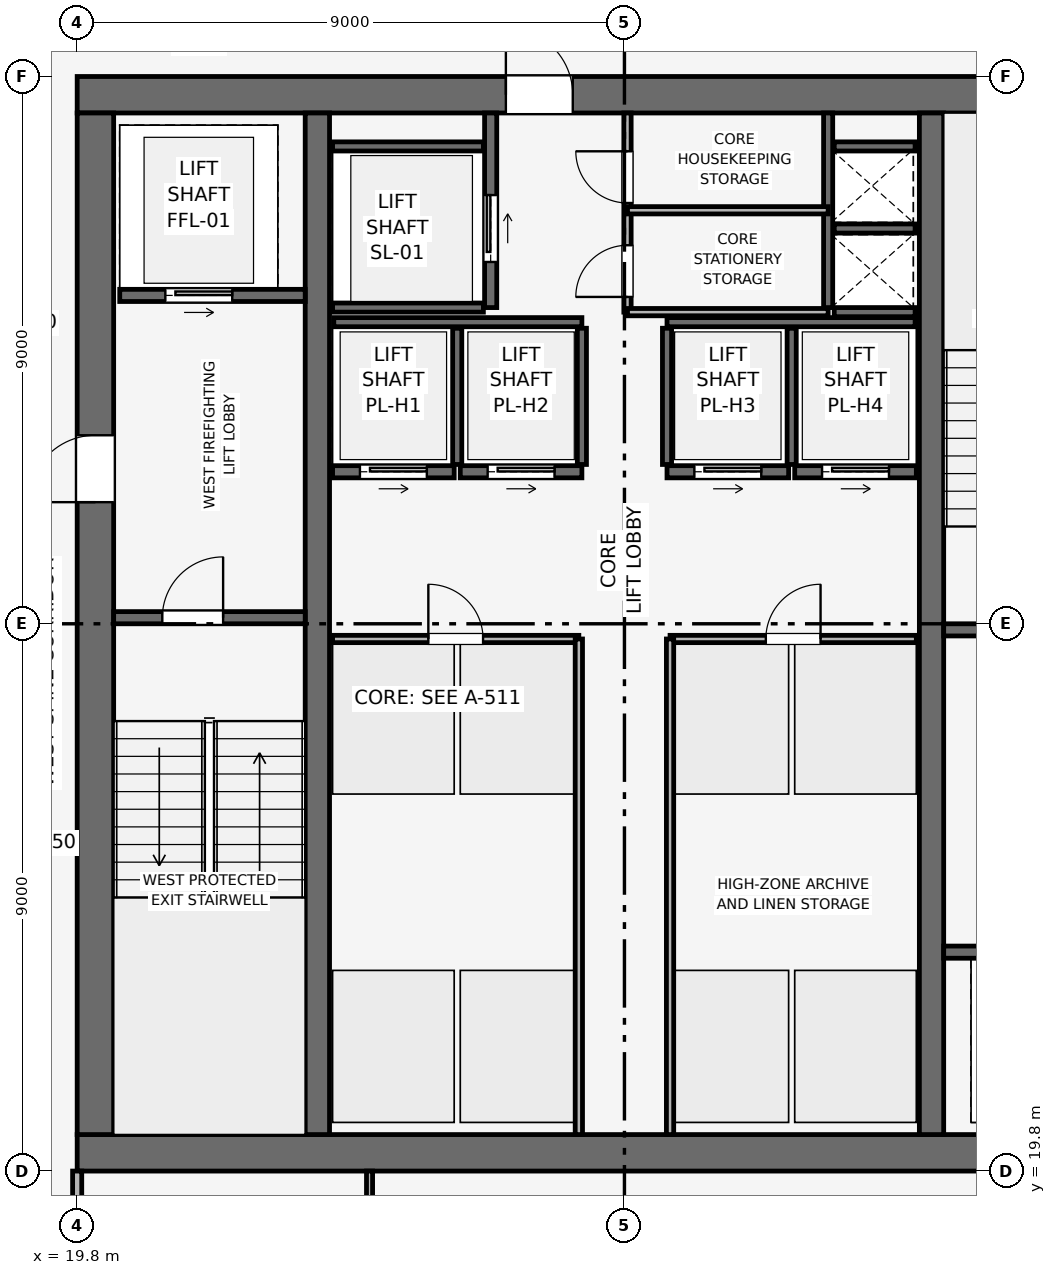
"""IFC4 building model, lengths in metres.
Left out: names, types, materials, properties, quantities, classifications, styles, units other than length and angle.
Written with IfcOpenShell. Run it as: python <this file> out.ifc"""

import sys

from ifc_helpers import new_model, si_unit, direction, frame, frame_2d, origin, place, context, subcontext, project, spatial, rectangle, extrude, element, fill, save


model = new_model("IFC4")
c1 = context("Model", 3, precision=1e-05, world=origin(), true_north=direction((0.0, 1.0)))
c2 = subcontext(c1, "Body", "Model", "MODEL_VIEW")
j1 = project(units=[si_unit("LENGTHUNIT", "METRE"), si_unit("PLANEANGLEUNIT", "RADIAN")], contexts=[c1])
p1 = place(None, origin())
s1 = spatial("IfcSite", under=j1, at=p1, CompositionType="ELEMENT")
p2 = place(p1, origin())
s2 = spatial("IfcBuilding", under=s1, at=p2, CompositionType="ELEMENT")
p3 = place(p2, frame((0.0, 0.0, 329.25)))
s3 = spatial("IfcBuildingStorey", under=s2, at=p3, CompositionType="ELEMENT", Elevation=329.25)
p4 = place(p3, frame((19.8, 20.1, 0.0), z_axis=(0.0, 0.0, 1.0), x_axis=(1.0, 0.0, 0.0)))
e1 = element("IfcWall", 1, at=p4, inside=s3, PredefinedType="SHEAR", context=c2, shape_type="SweptSolid", body=[
    extrude(rectangle(XDim=18.0, YDim=0.6, at=frame_2d((9.0, 0.0))), origin(), (0.0, 0.0, 1.0), 3.75),
])
p5 = place(p3, frame((19.8, 37.5, 0.0), z_axis=(0.0, 0.0, 1.0), x_axis=(1.0, 0.0, 0.0)))
e2 = element("IfcWall", 2, at=p5, inside=s3, PredefinedType="SHEAR", context=c2, shape_type="SweptSolid", body=[
    extrude(rectangle(XDim=18.0, YDim=0.6, at=frame_2d((9.0, 0.0))), origin(), (0.0, 0.0, 1.0), 3.75),
])
p6 = place(p5, frame((7.05, 0.0, 0.0)))
e3 = element("IfcOpeningElement", 3, at=p6, cuts=e2, PredefinedType="OPENING", context=c2, shape_type="SweptSolid", body=[
    extrude(rectangle(XDim=1.1, YDim=2.15, at=frame_2d((0.55, 1.075))), frame((0.0, 0.31, 0.0), z_axis=(0.0, -1.0, 0.0), x_axis=(1.0, 0.0, 0.0)), (0.0, 0.0, 1.0), 0.62),
])
p7 = place(p3, frame((20.1, 20.4, 0.0), z_axis=(0.0, 0.0, 1.0), x_axis=(0.0, 1.0, 0.0)))
e4 = element("IfcWall", 4, at=p7, inside=s3, PredefinedType="SHEAR", context=c2, shape_type="SweptSolid", body=[
    extrude(rectangle(XDim=16.8, YDim=0.6, at=frame_2d((8.4, 0.0))), origin(), (0.0, 0.0, 1.0), 3.75),
])
p8 = place(p7, frame((10.4, 0.0, 0.0)))
e5 = element("IfcOpeningElement", 5, at=p8, cuts=e4, PredefinedType="OPENING", context=c2, shape_type="SweptSolid", body=[
    extrude(rectangle(XDim=1.1, YDim=2.15, at=frame_2d((0.55, 1.075))), frame((0.0, 0.31, 0.0), z_axis=(0.0, -1.0, 0.0), x_axis=(1.0, 0.0, 0.0)), (0.0, 0.0, 1.0), 0.62),
])
for number, where, z_axis, x_axis in (
    (6, (23.75, 20.4, 0.0), (0.0, 0.0, 1.0), (0.0, 1.0, 0.0)),
    (7, (33.85, 20.4, 0.0), (0.0, 0.0, 1.0), (0.0, 1.0, 0.0)),
):
    element("IfcWall", number, at=place(p3, frame(where, z_axis=z_axis, x_axis=x_axis)), inside=s3, PredefinedType="SHEAR", context=c2, shape_type="SweptSolid", body=[
        extrude(rectangle(XDim=16.8, YDim=0.4, at=frame_2d((8.4, 0.0))), origin(), (0.0, 0.0, 1.0), 3.75),
    ])
p9 = place(p3, frame((20.4, 28.9, 0.0), z_axis=(0.0, 0.0, 1.0), x_axis=(1.0, 0.0, 0.0)))
e8 = element("IfcWall", 8, at=p9, inside=s3, PredefinedType="SHEAR", context=c2, shape_type="SweptSolid", body=[
    extrude(rectangle(XDim=3.15, YDim=0.2, at=frame_2d((1.575, 0.0))), origin(), (0.0, 0.0, 1.0), 3.51),
])
p10 = place(p9, frame((0.8, 0.0, 0.0)))
e9 = element("IfcOpeningElement", 9, at=p10, cuts=e8, PredefinedType="OPENING", context=c2, shape_type="SweptSolid", body=[
    extrude(rectangle(XDim=1.0, YDim=2.1, at=frame_2d((0.5, 1.05))), frame((0.0, 0.11, 0.0), z_axis=(0.0, -1.0, 0.0), x_axis=(1.0, 0.0, 0.0)), (0.0, 0.0, 1.0), 0.22),
])
p11 = place(p3, frame((34.05, 28.7, 0.0), z_axis=(0.0, 0.0, 1.0), x_axis=(1.0, 0.0, 0.0)))
e10 = element("IfcWall", 10, at=p11, inside=s3, PredefinedType="SHEAR", context=c2, shape_type="SweptSolid", body=[
    extrude(rectangle(XDim=3.15, YDim=0.2, at=frame_2d((1.575, 0.0))), origin(), (0.0, 0.0, 1.0), 3.51),
])
p12 = place(p11, frame((0.8, 0.0, 0.0)))
e11 = element("IfcOpeningElement", 11, at=p12, cuts=e10, PredefinedType="OPENING", context=c2, shape_type="SweptSolid", body=[
    extrude(rectangle(XDim=1.0, YDim=2.1, at=frame_2d((0.5, 1.05))), frame((0.0, 0.11, 0.0), z_axis=(0.0, -1.0, 0.0), x_axis=(1.0, 0.0, 0.0)), (0.0, 0.0, 1.0), 0.22),
])
p13 = place(p3, frame((32.15, 34.0, 0.0), z_axis=(0.0, 0.0, 1.0), x_axis=(0.0, 1.0, 0.0)))
e12 = element("IfcWall", 12, at=p13, inside=s3, PredefinedType="SHEAR", context=c2, shape_type="SweptSolid", body=[
    extrude(rectangle(XDim=3.2, YDim=0.15, at=frame_2d((1.6, 0.0))), origin(), (0.0, 0.0, 1.0), 3.51),
])
for number, where, z_axis, x_axis in (
    (13, (32.25, 33.925, 0.0), (0.0, 0.0, 1.0), (1.0, 0.0, 0.0)),
    (14, (32.25, 35.3, 0.0), (0.0, 0.0, 1.0), (1.0, 0.0, 0.0)),
):
    element("IfcWall", number, at=place(p3, frame(where, z_axis=z_axis, x_axis=x_axis)), inside=s3, PredefinedType="SHEAR", context=c2, shape_type="SweptSolid", body=[
        extrude(rectangle(XDim=1.33, YDim=0.15, at=frame_2d((0.665, 0.0))), origin(), (0.0, 0.0, 1.0), 3.51),
    ])
p14 = place(p3, frame((20.5, 34.2, 0.0), z_axis=(0.0, 0.0, 1.0), x_axis=(1.0, 0.0, 0.0)))
e15 = element("IfcWall", 15, at=p14, inside=s3, PredefinedType="SHEAR", context=c2, shape_type="SweptSolid", body=[
    extrude(rectangle(XDim=3.05, YDim=0.2, at=frame_2d((1.525, 0.0))), origin(), (0.0, 0.0, 1.0), 3.51),
])
p15 = place(p14, frame((0.75, 0.0, 0.0)))
e16 = element("IfcOpeningElement", 16, at=p15, cuts=e15, PredefinedType="OPENING", context=c2, shape_type="SweptSolid", body=[
    extrude(rectangle(XDim=1.1, YDim=2.15, at=frame_2d((0.55, 1.075))), frame((0.0, 0.11, 0.0), z_axis=(0.0, -1.0, 0.0), x_axis=(1.0, 0.0, 0.0)), (0.0, 0.0, 1.0), 0.22),
])
p16 = place(p3, frame((34.05, 23.4, 0.0), z_axis=(0.0, 0.0, 1.0), x_axis=(1.0, 0.0, 0.0)))
e17 = element("IfcWall", 17, at=p16, inside=s3, PredefinedType="SHEAR", context=c2, shape_type="SweptSolid", body=[
    extrude(rectangle(XDim=3.05, YDim=0.2, at=frame_2d((1.525, 0.0))), origin(), (0.0, 0.0, 1.0), 3.51),
])
p17 = place(p16, frame((1.2, 0.0, 0.0)))
e18 = element("IfcOpeningElement", 18, at=p17, cuts=e17, PredefinedType="OPENING", context=c2, shape_type="SweptSolid", body=[
    extrude(rectangle(XDim=1.1, YDim=2.15, at=frame_2d((0.55, 1.075))), frame((0.0, 0.11, 0.0), z_axis=(0.0, -1.0, 0.0), x_axis=(1.0, 0.0, 0.0)), (0.0, 0.0, 1.0), 0.22),
])
p18 = place(p3, frame((26.6, 34.0, 0.0), z_axis=(0.0, 0.0, 1.0), x_axis=(0.0, 1.0, 0.0)))
e19 = element("IfcWall", 19, at=p18, inside=s3, PredefinedType="SHEAR", context=c2, shape_type="SweptSolid", body=[
    extrude(rectangle(XDim=3.2, YDim=0.2, at=frame_2d((1.6, 0.0))), origin(), (0.0, 0.0, 1.0), 3.51),
])
p19 = place(p18, frame((0.75, 0.0, 0.0)))
e20 = element("IfcOpeningElement", 20, at=p19, cuts=e19, PredefinedType="OPENING", context=c2, shape_type="SweptSolid", body=[
    extrude(rectangle(XDim=1.1, YDim=2.15, at=frame_2d((0.55, 1.075))), frame((0.0, 0.11, 0.0), z_axis=(0.0, -1.0, 0.0), x_axis=(1.0, 0.0, 0.0)), (0.0, 0.0, 1.0), 0.22),
])
for number, where, z_axis, x_axis in (
    (21, (24.0, 34.0, 0.0), (0.0, 0.0, 1.0), (1.0, 0.0, 0.0)),
    (22, (24.0, 36.65, 0.0), (0.0, 0.0, 1.0), (1.0, 0.0, 0.0)),
):
    element("IfcWall", number, at=place(p3, frame(where, z_axis=z_axis, x_axis=x_axis)), inside=s3, PredefinedType="SHEAR", context=c2, shape_type="SweptSolid", body=[
        extrude(rectangle(XDim=2.48, YDim=0.15, at=frame_2d((1.24, 0.0))), origin(), (0.0, 0.0, 1.0), 3.51),
    ])
p20 = place(p3, frame((24.0, 31.3, 0.0), z_axis=(0.0, 0.0, 1.0), x_axis=(1.0, 0.0, 0.0)))
e23 = element("IfcWall", 23, at=p20, inside=s3, PredefinedType="SHEAR", context=c2, shape_type="SweptSolid", body=[
    extrude(rectangle(XDim=2.0, YDim=0.2, at=frame_2d((1.0, 0.0))), origin(), (0.0, 0.0, 1.0), 3.51),
])
p21 = place(p20, frame((0.45, 0.0, 0.0)))
e24 = element("IfcOpeningElement", 24, at=p21, cuts=e23, PredefinedType="OPENING", context=c2, shape_type="SweptSolid", body=[
    extrude(rectangle(XDim=1.1, YDim=2.15, at=frame_2d((0.55, 1.075))), frame((0.0, 0.11, 0.0), z_axis=(0.0, -1.0, 0.0), x_axis=(1.0, 0.0, 0.0)), (0.0, 0.0, 1.0), 0.22),
])
p22 = place(p3, frame((26.1, 31.3, 0.0), z_axis=(0.0, 0.0, 1.0), x_axis=(1.0, 0.0, 0.0)))
e25 = element("IfcWall", 25, at=p22, inside=s3, PredefinedType="SHEAR", context=c2, shape_type="SweptSolid", body=[
    extrude(rectangle(XDim=2.0, YDim=0.2, at=frame_2d((1.0, 0.0))), origin(), (0.0, 0.0, 1.0), 3.51),
])
p23 = place(p22, frame((0.45, 0.0, 0.0)))
e26 = element("IfcOpeningElement", 26, at=p23, cuts=e25, PredefinedType="OPENING", context=c2, shape_type="SweptSolid", body=[
    extrude(rectangle(XDim=1.1, YDim=2.15, at=frame_2d((0.55, 1.075))), frame((0.0, 0.11, 0.0), z_axis=(0.0, -1.0, 0.0), x_axis=(1.0, 0.0, 0.0)), (0.0, 0.0, 1.0), 0.22),
])
p24 = place(p3, frame((29.5, 31.3, 0.0), z_axis=(0.0, 0.0, 1.0), x_axis=(1.0, 0.0, 0.0)))
e27 = element("IfcWall", 27, at=p24, inside=s3, PredefinedType="SHEAR", context=c2, shape_type="SweptSolid", body=[
    extrude(rectangle(XDim=2.0, YDim=0.2, at=frame_2d((1.0, 0.0))), origin(), (0.0, 0.0, 1.0), 3.51),
])
p25 = place(p24, frame((0.45, 0.0, 0.0)))
e28 = element("IfcOpeningElement", 28, at=p25, cuts=e27, PredefinedType="OPENING", context=c2, shape_type="SweptSolid", body=[
    extrude(rectangle(XDim=1.1, YDim=2.15, at=frame_2d((0.55, 1.075))), frame((0.0, 0.11, 0.0), z_axis=(0.0, -1.0, 0.0), x_axis=(1.0, 0.0, 0.0)), (0.0, 0.0, 1.0), 0.22),
])
p26 = place(p3, frame((31.6, 31.3, 0.0), z_axis=(0.0, 0.0, 1.0), x_axis=(1.0, 0.0, 0.0)))
e29 = element("IfcWall", 29, at=p26, inside=s3, PredefinedType="SHEAR", context=c2, shape_type="SweptSolid", body=[
    extrude(rectangle(XDim=2.0, YDim=0.2, at=frame_2d((1.0, 0.0))), origin(), (0.0, 0.0, 1.0), 3.51),
])
p27 = place(p26, frame((0.45, 0.0, 0.0)))
e30 = element("IfcOpeningElement", 30, at=p27, cuts=e29, PredefinedType="OPENING", context=c2, shape_type="SweptSolid", body=[
    extrude(rectangle(XDim=1.1, YDim=2.15, at=frame_2d((0.55, 1.075))), frame((0.0, 0.11, 0.0), z_axis=(0.0, -1.0, 0.0), x_axis=(1.0, 0.0, 0.0)), (0.0, 0.0, 1.0), 0.22),
])
p28 = place(p3, frame((32.25, 36.65, 0.0), z_axis=(0.0, 0.0, 1.0), x_axis=(1.0, 0.0, 0.0)))
e31 = element("IfcWall", 31, at=p28, inside=s3, PredefinedType="SHEAR", context=c2, shape_type="SweptSolid", body=[
    extrude(rectangle(XDim=1.33, YDim=0.15, at=frame_2d((0.665, 0.0))), origin(), (0.0, 0.0, 1.0), 3.51),
])
for number, where, z_axis, x_axis in (
    (32, (24.02, 33.76, 0.0), (0.0, 0.0, 1.0), (1.0, 0.0, 0.0)),
    (33, (29.5, 33.76, 0.0), (0.0, 0.0, 1.0), (1.0, 0.0, 0.0)),
):
    element("IfcWall", number, at=place(p3, frame(where, z_axis=z_axis, x_axis=x_axis)), inside=s3, PredefinedType="SHEAR", context=c2, shape_type="SweptSolid", body=[
        extrude(rectangle(XDim=4.08, YDim=0.15, at=frame_2d((2.04, 0.0))), origin(), (0.0, 0.0, 1.0), 3.51),
    ])
for number, where, z_axis, x_axis in (
    (34, (26.05, 31.42, 0.0), (0.0, 0.0, 1.0), (0.0, 1.0, 0.0)),
    (35, (28.1, 31.42, 0.0), (0.0, 0.0, 1.0), (0.0, 1.0, 0.0)),
    (36, (29.5, 31.42, 0.0), (0.0, 0.0, 1.0), (0.0, 1.0, 0.0)),
    (37, (31.55, 31.42, 0.0), (0.0, 0.0, 1.0), (0.0, 1.0, 0.0)),
):
    element("IfcWall", number, at=place(p3, frame(where, z_axis=z_axis, x_axis=x_axis)), inside=s3, PredefinedType="SHEAR", context=c2, shape_type="SweptSolid", body=[
        extrude(rectangle(XDim=2.24, YDim=0.15, at=frame_2d((1.12, 0.0))), origin(), (0.0, 0.0, 1.0), 3.51),
    ])
p29 = place(p3, frame((28.85, 33.925, 0.0), z_axis=(0.0, 0.0, 1.0), x_axis=(0.0, 1.0, 0.0)))
e38 = element("IfcWall", 38, at=p29, inside=s3, PredefinedType="PARTITIONING", context=c2, shape_type="SweptSolid", body=[
    extrude(rectangle(XDim=3.275, YDim=0.12, at=frame_2d((1.637, 0.0))), origin(), (0.0, 0.0, 1.0), 3.51),
])
p30 = place(p29, frame((0.25, 0.0, 0.0)))
e39 = element("IfcOpeningElement", 39, at=p30, cuts=e38, PredefinedType="OPENING", context=c2, shape_type="SweptSolid", body=[
    extrude(rectangle(XDim=0.85, YDim=2.1, at=frame_2d((0.425, 1.05))), frame((0.0, 0.07, 0.0), z_axis=(0.0, -1.0, 0.0), x_axis=(1.0, 0.0, 0.0)), (0.0, 0.0, 1.0), 0.14),
])
p31 = place(p29, frame((1.795, 0.0, 0.0)))
e40 = element("IfcOpeningElement", 40, at=p31, cuts=e38, PredefinedType="OPENING", context=c2, shape_type="SweptSolid", body=[
    extrude(rectangle(XDim=0.85, YDim=2.1, at=frame_2d((0.425, 1.05))), frame((0.0, 0.07, 0.0), z_axis=(0.0, -1.0, 0.0), x_axis=(1.0, 0.0, 0.0)), (0.0, 0.0, 1.0), 0.14),
])
for number, where, z_axis, x_axis in (
    (41, (28.85, 35.6, 0.0), (0.0, 0.0, 1.0), (1.0, 0.0, 0.0)),
    (42, (28.85, 33.925, 0.0), (0.0, 0.0, 1.0), (1.0, 0.0, 0.0)),
):
    element("IfcWall", number, at=place(p3, frame(where, z_axis=z_axis, x_axis=x_axis)), inside=s3, PredefinedType="PARTITIONING", context=c2, shape_type="SweptSolid", body=[
        extrude(rectangle(XDim=3.3, YDim=0.12, at=frame_2d((1.65, 0.0))), origin(), (0.0, 0.0, 1.0), 3.51),
    ])
p32 = place(p3, frame((24.0, 28.55, 0.0), z_axis=(0.0, 0.0, 1.0), x_axis=(1.0, 0.0, 0.0)))
e43 = element("IfcWall", 43, at=p32, inside=s3, PredefinedType="PARTITIONING", context=c2, shape_type="SweptSolid", body=[
    extrude(rectangle(XDim=4.05, YDim=0.12, at=frame_2d((2.025, 0.0))), origin(), (0.0, 0.0, 1.0), 3.51),
])
p33 = place(p32, frame((1.575, 0.0, 0.0)))
e44 = element("IfcOpeningElement", 44, at=p33, cuts=e43, PredefinedType="OPENING", context=c2, shape_type="SweptSolid", body=[
    extrude(rectangle(XDim=0.9, YDim=2.1, at=frame_2d((0.45, 1.05))), frame((0.0, 0.07, 0.0), z_axis=(0.0, -1.0, 0.0), x_axis=(1.0, 0.0, 0.0)), (0.0, 0.0, 1.0), 0.14),
])
p34 = place(p3, frame((28.05, 20.4, 0.0), z_axis=(0.0, 0.0, 1.0), x_axis=(0.0, 1.0, 0.0)))
e45 = element("IfcWall", 45, at=p34, inside=s3, PredefinedType="PARTITIONING", context=c2, shape_type="SweptSolid", body=[
    extrude(rectangle(XDim=8.15, YDim=0.12, at=frame_2d((4.075, 0.0))), origin(), (0.0, 0.0, 1.0), 3.51),
])
p35 = place(p3, frame((29.55, 28.55, 0.0), z_axis=(0.0, 0.0, 1.0), x_axis=(1.0, 0.0, 0.0)))
e46 = element("IfcWall", 46, at=p35, inside=s3, PredefinedType="PARTITIONING", context=c2, shape_type="SweptSolid", body=[
    extrude(rectangle(XDim=4.05, YDim=0.12, at=frame_2d((2.025, 0.0))), origin(), (0.0, 0.0, 1.0), 3.51),
])
p36 = place(p35, frame((1.575, 0.0, 0.0)))
e47 = element("IfcOpeningElement", 47, at=p36, cuts=e46, PredefinedType="OPENING", context=c2, shape_type="SweptSolid", body=[
    extrude(rectangle(XDim=0.9, YDim=2.1, at=frame_2d((0.45, 1.05))), frame((0.0, 0.07, 0.0), z_axis=(0.0, -1.0, 0.0), x_axis=(1.0, 0.0, 0.0)), (0.0, 0.0, 1.0), 0.14),
])
p37 = place(p3, frame((29.55, 20.4, 0.0), z_axis=(0.0, 0.0, 1.0), x_axis=(0.0, 1.0, 0.0)))
e48 = element("IfcWall", 48, at=p37, inside=s3, PredefinedType="PARTITIONING", context=c2, shape_type="SweptSolid", body=[
    extrude(rectangle(XDim=8.15, YDim=0.12, at=frame_2d((4.075, 0.0))), origin(), (0.0, 0.0, 1.0), 3.51),
])
p38 = place(p3, frame((19.8, 6.13, 0.0), z_axis=(0.0, 0.0, 1.0), x_axis=(0.0, 1.0, 0.0)))
e49 = element("IfcWall", 49, at=p38, inside=s3, PredefinedType="PARTITIONING", context=c2, shape_type="SweptSolid", body=[
    extrude(rectangle(XDim=13.67, YDim=0.15, at=frame_2d((6.835, 0.0))), origin(), (0.0, 0.0, 1.0), 3.095),
])
p39 = place(p38, frame((9.47, 0.0, 0.0)))
e50 = element("IfcOpeningElement", 50, at=p39, cuts=e49, PredefinedType="OPENING", context=c2, shape_type="SweptSolid", body=[
    extrude(rectangle(XDim=0.9, YDim=2.1, at=frame_2d((0.45, 1.05))), frame((0.0, 0.085, 0.0), z_axis=(0.0, -1.0, 0.0), x_axis=(1.0, 0.0, 0.0)), (0.0, 0.0, 1.0), 0.17),
])
p40 = place(p3, frame((24.608, 6.13, 0.0), z_axis=(0.0, 0.0, 1.0), x_axis=(0.0, 1.0, 0.0)))
e51 = element("IfcWall", 51, at=p40, inside=s3, PredefinedType="MOVABLE", context=c2, shape_type="SweptSolid", body=[
    extrude(rectangle(XDim=13.67, YDim=0.1, at=frame_2d((6.835, 0.0))), origin(), (0.0, 0.0, 1.0), 3.135),
])
p41 = place(p40, frame((11.27, 0.0, 0.0)))
e52 = element("IfcOpeningElement", 52, at=p41, cuts=e51, PredefinedType="OPENING", context=c2, shape_type="SweptSolid", body=[
    extrude(rectangle(XDim=0.9, YDim=2.1, at=frame_2d((0.45, 1.05))), frame((0.0, 0.06, 0.0), z_axis=(0.0, -1.0, 0.0), x_axis=(1.0, 0.0, 0.0)), (0.0, 0.0, 1.0), 0.12),
])
p42 = place(p10, origin())
e53 = element("IfcDoor", 53, at=p42, inside=s3, OperationType="SINGLE_SWING_RIGHT", PredefinedType="DOOR", context=c2, shape_type="SweptSolid", body=[
    extrude(rectangle(XDim=1.0, YDim=2.1, at=frame_2d((0.5, 1.05))), frame((0.0, 0.025, 0.0), z_axis=(0.0, -1.0, 0.0), x_axis=(1.0, 0.0, 0.0)), (0.0, 0.0, 1.0), 0.05),
])
fill(e9, e53)
p43 = place(p15, origin())
e54 = element("IfcDoor", 54, at=p43, inside=s3, OperationType="SLIDING_TO_RIGHT", PredefinedType="DOOR", context=c2, shape_type="SweptSolid", body=[
    extrude(rectangle(XDim=1.1, YDim=2.15, at=frame_2d((0.55, 1.075))), frame((0.0, 0.025, 0.0), z_axis=(0.0, -1.0, 0.0), x_axis=(1.0, 0.0, 0.0)), (0.0, 0.0, 1.0), 0.05),
])
fill(e16, e54)
p44 = place(p19, origin())
e55 = element("IfcDoor", 55, at=p44, inside=s3, OperationType="SLIDING_TO_RIGHT", PredefinedType="DOOR", context=c2, shape_type="SweptSolid", body=[
    extrude(rectangle(XDim=1.1, YDim=2.15, at=frame_2d((0.55, 1.075))), frame((0.0, 0.025, 0.0), z_axis=(0.0, -1.0, 0.0), x_axis=(1.0, 0.0, 0.0)), (0.0, 0.0, 1.0), 0.05),
])
fill(e20, e55)
p45 = place(p21, origin())
e56 = element("IfcDoor", 56, at=p45, inside=s3, OperationType="SLIDING_TO_RIGHT", PredefinedType="DOOR", context=c2, shape_type="SweptSolid", body=[
    extrude(rectangle(XDim=1.1, YDim=2.15, at=frame_2d((0.55, 1.075))), frame((0.0, 0.025, 0.0), z_axis=(0.0, -1.0, 0.0), x_axis=(1.0, 0.0, 0.0)), (0.0, 0.0, 1.0), 0.05),
])
fill(e24, e56)
p46 = place(p23, origin())
e57 = element("IfcDoor", 57, at=p46, inside=s3, OperationType="SLIDING_TO_RIGHT", PredefinedType="DOOR", context=c2, shape_type="SweptSolid", body=[
    extrude(rectangle(XDim=1.1, YDim=2.15, at=frame_2d((0.55, 1.075))), frame((0.0, 0.025, 0.0), z_axis=(0.0, -1.0, 0.0), x_axis=(1.0, 0.0, 0.0)), (0.0, 0.0, 1.0), 0.05),
])
fill(e26, e57)
p47 = place(p25, origin())
e58 = element("IfcDoor", 58, at=p47, inside=s3, OperationType="SLIDING_TO_RIGHT", PredefinedType="DOOR", context=c2, shape_type="SweptSolid", body=[
    extrude(rectangle(XDim=1.1, YDim=2.15, at=frame_2d((0.55, 1.075))), frame((0.0, 0.025, 0.0), z_axis=(0.0, -1.0, 0.0), x_axis=(1.0, 0.0, 0.0)), (0.0, 0.0, 1.0), 0.05),
])
fill(e28, e58)
p48 = place(p27, origin())
e59 = element("IfcDoor", 59, at=p48, inside=s3, OperationType="SLIDING_TO_RIGHT", PredefinedType="DOOR", context=c2, shape_type="SweptSolid", body=[
    extrude(rectangle(XDim=1.1, YDim=2.15, at=frame_2d((0.55, 1.075))), frame((0.0, 0.025, 0.0), z_axis=(0.0, -1.0, 0.0), x_axis=(1.0, 0.0, 0.0)), (0.0, 0.0, 1.0), 0.05),
])
fill(e30, e59)
p49 = place(p30, origin())
e60 = element("IfcDoor", 60, at=p49, inside=s3, OperationType="SINGLE_SWING_LEFT", PredefinedType="DOOR", context=c2, shape_type="SweptSolid", body=[
    extrude(rectangle(XDim=0.85, YDim=2.1, at=frame_2d((0.425, 1.05))), frame((0.0, 0.025, 0.0), z_axis=(0.0, -1.0, 0.0), x_axis=(1.0, 0.0, 0.0)), (0.0, 0.0, 1.0), 0.05),
])
fill(e39, e60)
p50 = place(p31, origin())
e61 = element("IfcDoor", 61, at=p50, inside=s3, OperationType="SINGLE_SWING_RIGHT", PredefinedType="DOOR", context=c2, shape_type="SweptSolid", body=[
    extrude(rectangle(XDim=0.85, YDim=2.1, at=frame_2d((0.425, 1.05))), frame((0.0, 0.025, 0.0), z_axis=(0.0, -1.0, 0.0), x_axis=(1.0, 0.0, 0.0)), (0.0, 0.0, 1.0), 0.05),
])
fill(e40, e61)
p51 = place(p33, origin())
e62 = element("IfcDoor", 62, at=p51, inside=s3, OperationType="SINGLE_SWING_LEFT", PredefinedType="DOOR", context=c2, shape_type="SweptSolid", body=[
    extrude(rectangle(XDim=0.9, YDim=2.1, at=frame_2d((0.45, 1.05))), frame((0.0, 0.025, 0.0), z_axis=(0.0, -1.0, 0.0), x_axis=(1.0, 0.0, 0.0)), (0.0, 0.0, 1.0), 0.05),
])
fill(e44, e62)
p52 = place(p36, origin())
e63 = element("IfcDoor", 63, at=p52, inside=s3, OperationType="SINGLE_SWING_RIGHT", PredefinedType="DOOR", context=c2, shape_type="SweptSolid", body=[
    extrude(rectangle(XDim=0.9, YDim=2.1, at=frame_2d((0.45, 1.05))), frame((0.0, 0.025, 0.0), z_axis=(0.0, -1.0, 0.0), x_axis=(1.0, 0.0, 0.0)), (0.0, 0.0, 1.0), 0.05),
])
fill(e47, e63)
p53 = place(p8, origin())
e64 = element("IfcDoor", 64, at=p53, inside=s3, OperationType="SINGLE_SWING_LEFT", PredefinedType="DOOR", context=c2, shape_type="SweptSolid", body=[
    extrude(rectangle(XDim=1.1, YDim=2.15, at=frame_2d((0.55, 1.075))), frame((0.0, 0.025, 0.0), z_axis=(0.0, -1.0, 0.0), x_axis=(1.0, 0.0, 0.0)), (0.0, 0.0, 1.0), 0.05),
])
fill(e5, e64)
p54 = place(p6, origin())
e65 = element("IfcDoor", 65, at=p54, inside=s3, OperationType="SINGLE_SWING_LEFT", PredefinedType="DOOR", context=c2, shape_type="SweptSolid", body=[
    extrude(rectangle(XDim=1.1, YDim=2.15, at=frame_2d((0.55, 1.075))), frame((0.0, 0.025, 0.0), z_axis=(0.0, -1.0, 0.0), x_axis=(1.0, 0.0, 0.0)), (0.0, 0.0, 1.0), 0.05),
])
fill(e3, e65)
save(model, sys.argv[1])
